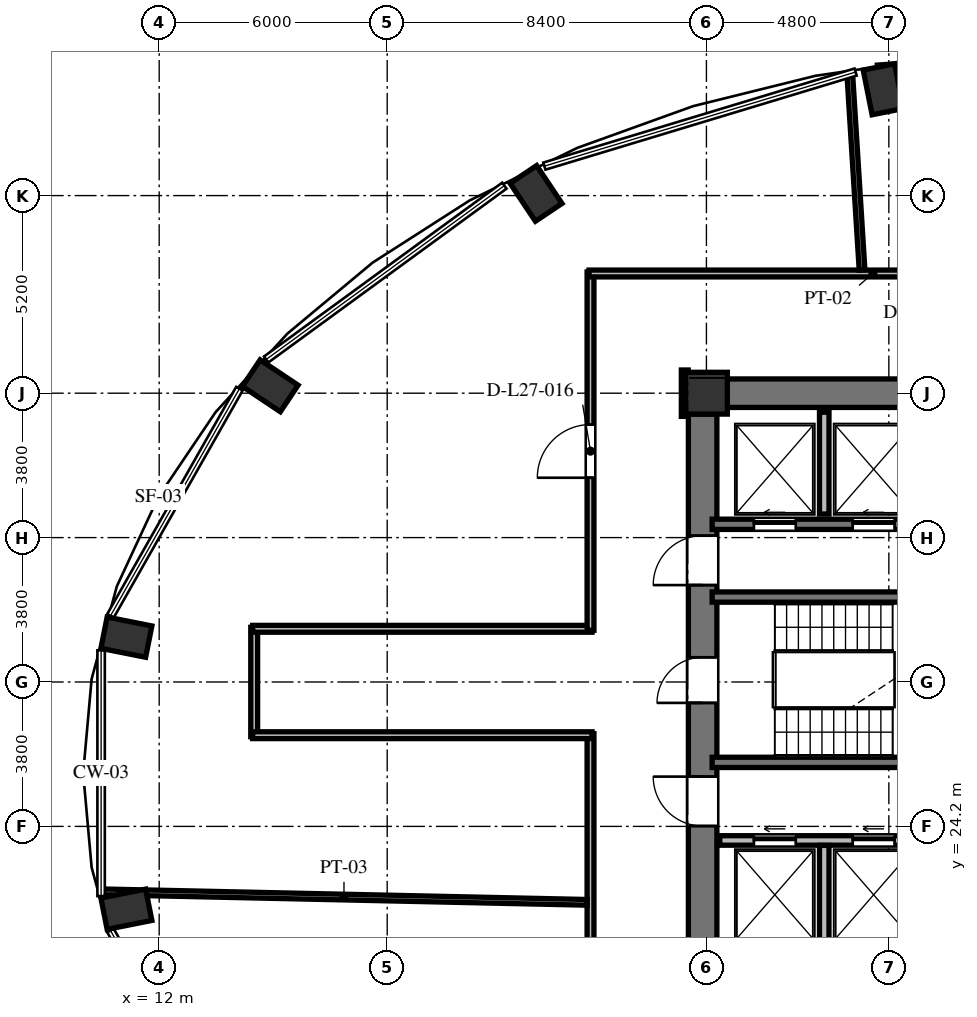
"""IFC4 building model, lengths in metres.
Left out: names, types, materials, properties, quantities, classifications, styles, units other than length and angle.
Written with IfcOpenShell. Run it as: python <this file> out.ifc"""

import sys

from ifc_helpers import new_model, si_unit, direction, frame, frame_2d, origin, origin_2d, place, context, subcontext, project, spatial, rectangle, extrude, element, fill, save


model = new_model("IFC4")
c1 = context("Model", 3, precision=1e-05, world=origin(), true_north=direction((0.0, 1.0)))
c2 = subcontext(c1, "Body", "Model", "MODEL_VIEW")
j1 = project(units=[si_unit("LENGTHUNIT", "METRE"), si_unit("PLANEANGLEUNIT", "RADIAN")], contexts=[c1])
p1 = place(None, origin())
s1 = spatial("IfcSite", under=j1, at=p1, CompositionType="ELEMENT")
p2 = place(p1, origin())
s2 = spatial("IfcBuilding", under=s1, at=p2, CompositionType="ELEMENT")
p3 = place(p2, frame((0.0, 0.0, 107.28)))
s3 = spatial("IfcBuildingStorey", under=s2, at=p3, CompositionType="ELEMENT", Elevation=107.28)
for number, where, z_axis, x_axis in (
    (1, (31.054, 43.597, 0.0), (0.0, 0.0, 1.0), (-0.195, 0.981, 0.0)),
    (2, (21.916, 40.857, 0.0), (0.0, 0.0, 1.0), (-0.556, 0.831, 0.0)),
    (3, (14.922, 35.795, 0.0), (0.0, 0.0, 1.0), (-0.831, 0.556, 0.0)),
    (4, (11.137, 29.18, 0.0), (0.0, 0.0, 1.0), (-0.981, 0.195, 0.0)),
    (5, (11.137, 22.02, 0.0), (0.0, 0.0, 1.0), (-0.981, -0.195, 0.0)),
):
    element("IfcColumn", number, at=place(p3, frame(where, z_axis=z_axis, x_axis=x_axis)), inside=s3, PredefinedType="COLUMN", context=c2, shape_type="SweptSolid", body=[
        extrude(rectangle(XDim=1.2, YDim=0.84, at=origin_2d()), origin(), (0.0, 0.0, 1.0), 3.648),
    ])
p4 = place(p3, frame((26.4, 35.6, 0.0), z_axis=(0.0, 0.0, 1.0), x_axis=(1.0, 0.0, 0.0)))
e6 = element("IfcColumn", 6, at=p4, inside=s3, PredefinedType="COLUMN", context=c2, shape_type="SweptSolid", body=[
    extrude(rectangle(XDim=1.1, YDim=1.1, at=origin_2d()), origin(), (0.0, 0.0, 1.0), 3.648),
])
p5 = place(p3, frame((26.3, 20.95, 0.0), z_axis=(0.0, 0.0, 1.0), x_axis=(0.0, 1.0, 0.0)))
e7 = element("IfcWall", 7, at=p5, inside=s3, PredefinedType="SHEAR", context=c2, shape_type="SweptSolid", body=[
    extrude(rectangle(XDim=14.1, YDim=0.75, at=frame_2d((7.05, 0.0))), origin(), (0.0, 0.0, 1.0), 3.648),
])
p6 = place(p5, frame((6.5, 0.0, 0.0)))
e8 = element("IfcOpeningElement", 8, at=p6, cuts=e7, PredefinedType="OPENING", context=c2, shape_type="SweptSolid", body=[
    extrude(rectangle(XDim=1.2, YDim=2.15, at=frame_2d((0.6, 1.075))), frame((0.0, 0.385, 0.0), z_axis=(0.0, -1.0, 0.0), x_axis=(1.0, 0.0, 0.0)), (0.0, 0.0, 1.0), 0.77),
])
p7 = place(p5, frame((9.6, 0.0, 0.0)))
e9 = element("IfcOpeningElement", 9, at=p7, cuts=e7, PredefinedType="OPENING", context=c2, shape_type="SweptSolid", body=[
    extrude(rectangle(XDim=1.3, YDim=2.2, at=frame_2d((0.65, 1.1))), frame((0.0, 0.385, 0.0), z_axis=(0.0, -1.0, 0.0), x_axis=(1.0, 0.0, 0.0)), (0.0, 0.0, 1.0), 0.77),
])
p8 = place(p5, frame((3.26, 0.0, 0.0)))
e10 = element("IfcOpeningElement", 10, at=p8, cuts=e7, PredefinedType="OPENING", context=c2, shape_type="SweptSolid", body=[
    extrude(rectangle(XDim=1.3, YDim=2.2, at=frame_2d((0.65, 1.1))), frame((0.0, 0.385, 0.0), z_axis=(0.0, -1.0, 0.0), x_axis=(1.0, 0.0, 0.0)), (0.0, 0.0, 1.0), 0.77),
])
p9 = place(p3, frame((26.95, 35.6, 0.0), z_axis=(0.0, 0.0, 1.0), x_axis=(1.0, 0.0, 0.0)))
e11 = element("IfcWall", 11, at=p9, inside=s3, PredefinedType="SHEAR", context=c2, shape_type="SweptSolid", body=[
    extrude(rectangle(XDim=5.375, YDim=0.75, at=frame_2d((2.688, 0.0))), origin(), (0.0, 0.0, 1.0), 3.648),
])
p10 = place(p3, frame((36.179, 44.453, 0.0), z_axis=(0.0, 0.0, 1.0), x_axis=(-0.997431890304, -0.071621394884, 0.0)))
e12 = element("IfcWall", 12, at=p10, inside=s3, PredefinedType="SOLIDWALL", context=c2, shape_type="SweptSolid", body=[
    extrude(rectangle(XDim=5.284, YDim=0.32, at=frame_2d((2.642, 0.0))), origin(), (0.0, 0.0, 1.0), 3.428),
])
p11 = place(p10, frame((2.042, 0.0, 0.85)))
e13 = element("IfcOpeningElement", 13, at=p11, cuts=e12, PredefinedType="OPENING", context=c2, shape_type="SweptSolid", body=[
    extrude(rectangle(XDim=1.2, YDim=1.8, at=frame_2d((0.6, 0.9))), frame((0.0, 0.17, 0.0), z_axis=(0.0, -1.0, 0.0), x_axis=(1.0, 0.0, 0.0)), (0.0, 0.0, 1.0), 0.34),
])
for number, where, z_axis, x_axis in (
    (14, (26.55, 30.235, 0.0), (0.0, 0.0, 1.0), (1.0, 0.0, 0.0)),
    (15, (26.55, 25.885, 0.0), (0.0, 0.0, 1.0), (1.0, 0.0, 0.0)),
):
    element("IfcWall", number, at=place(p3, frame(where, z_axis=z_axis, x_axis=x_axis)), inside=s3, PredefinedType="SHEAR", context=c2, shape_type="SweptSolid", body=[
        extrude(rectangle(XDim=7.985, YDim=0.27, at=frame_2d((3.992, 0.0))), origin(), (0.0, 0.0, 1.0), 3.648),
    ])
p12 = place(p3, frame((26.55, 32.15, 0.0), z_axis=(0.0, 0.0, 1.0), x_axis=(1.0, 0.0, 0.0)))
e16 = element("IfcWall", 16, at=p12, inside=s3, PredefinedType="SHEAR", context=c2, shape_type="SweptSolid", body=[
    extrude(rectangle(XDim=16.4, YDim=0.27, at=frame_2d((8.2, 0.0))), origin(), (0.0, 0.0, 1.0), 3.648),
])
p13 = place(p12, frame((1.1, 0.0, 0.0)))
e17 = element("IfcOpeningElement", 17, at=p13, cuts=e16, PredefinedType="OPENING", context=c2, shape_type="SweptSolid", body=[
    extrude(rectangle(XDim=1.1, YDim=2.2, at=frame_2d((0.55, 1.1))), frame((0.0, 0.145, 0.0), z_axis=(0.0, -1.0, 0.0), x_axis=(1.0, 0.0, 0.0)), (0.0, 0.0, 1.0), 0.29),
])
p14 = place(p12, frame((3.7, 0.0, 0.0)))
e18 = element("IfcOpeningElement", 18, at=p14, cuts=e16, PredefinedType="OPENING", context=c2, shape_type="SweptSolid", body=[
    extrude(rectangle(XDim=1.1, YDim=2.2, at=frame_2d((0.55, 1.1))), frame((0.0, 0.145, 0.0), z_axis=(0.0, -1.0, 0.0), x_axis=(1.0, 0.0, 0.0)), (0.0, 0.0, 1.0), 0.29),
])
p15 = place(p12, frame((6.5, 0.0, 0.0)))
e19 = element("IfcOpeningElement", 19, at=p15, cuts=e16, PredefinedType="OPENING", context=c2, shape_type="SweptSolid", body=[
    extrude(rectangle(XDim=1.1, YDim=2.2, at=frame_2d((0.55, 1.1))), frame((0.0, 0.145, 0.0), z_axis=(0.0, -1.0, 0.0), x_axis=(1.0, 0.0, 0.0)), (0.0, 0.0, 1.0), 0.29),
])
p16 = place(p12, frame((9.1, 0.0, 0.0)))
e20 = element("IfcOpeningElement", 20, at=p16, cuts=e16, PredefinedType="OPENING", context=c2, shape_type="SweptSolid", body=[
    extrude(rectangle(XDim=1.1, YDim=2.2, at=frame_2d((0.55, 1.1))), frame((0.0, 0.145, 0.0), z_axis=(0.0, -1.0, 0.0), x_axis=(1.0, 0.0, 0.0)), (0.0, 0.0, 1.0), 0.29),
])
p17 = place(p12, frame((11.9, 0.0, 0.0)))
e21 = element("IfcOpeningElement", 21, at=p17, cuts=e16, PredefinedType="OPENING", context=c2, shape_type="SweptSolid", body=[
    extrude(rectangle(XDim=1.1, YDim=2.2, at=frame_2d((0.55, 1.1))), frame((0.0, 0.145, 0.0), z_axis=(0.0, -1.0, 0.0), x_axis=(1.0, 0.0, 0.0)), (0.0, 0.0, 1.0), 0.29),
])
p18 = place(p12, frame((14.5, 0.0, 0.0)))
e22 = element("IfcOpeningElement", 22, at=p18, cuts=e16, PredefinedType="OPENING", context=c2, shape_type="SweptSolid", body=[
    extrude(rectangle(XDim=1.1, YDim=2.2, at=frame_2d((0.55, 1.1))), frame((0.0, 0.145, 0.0), z_axis=(0.0, -1.0, 0.0), x_axis=(1.0, 0.0, 0.0)), (0.0, 0.0, 1.0), 0.29),
])
p19 = place(p3, frame((26.75, 23.83, 0.0), z_axis=(0.0, 0.0, 1.0), x_axis=(1.0, 0.0, 0.0)))
e23 = element("IfcWall", 23, at=p19, inside=s3, PredefinedType="SOLIDWALL", context=c2, shape_type="SweptSolid", body=[
    extrude(rectangle(XDim=16.2, YDim=0.25, at=frame_2d((8.1, 0.0))), origin(), (0.0, 0.0, 1.0), 3.428),
])
p20 = place(p19, frame((0.9, 0.0, 0.0)))
e24 = element("IfcOpeningElement", 24, at=p20, cuts=e23, PredefinedType="OPENING", context=c2, shape_type="SweptSolid", body=[
    extrude(rectangle(XDim=1.1, YDim=2.2, at=frame_2d((0.55, 1.1))), frame((0.0, 0.135, 0.0), z_axis=(0.0, -1.0, 0.0), x_axis=(1.0, 0.0, 0.0)), (0.0, 0.0, 1.0), 0.27),
])
p21 = place(p19, frame((3.5, 0.0, 0.0)))
e25 = element("IfcOpeningElement", 25, at=p21, cuts=e23, PredefinedType="OPENING", context=c2, shape_type="SweptSolid", body=[
    extrude(rectangle(XDim=1.1, YDim=2.2, at=frame_2d((0.55, 1.1))), frame((0.0, 0.135, 0.0), z_axis=(0.0, -1.0, 0.0), x_axis=(1.0, 0.0, 0.0)), (0.0, 0.0, 1.0), 0.27),
])
p22 = place(p19, frame((6.3, 0.0, 0.0)))
e26 = element("IfcOpeningElement", 26, at=p22, cuts=e23, PredefinedType="OPENING", context=c2, shape_type="SweptSolid", body=[
    extrude(rectangle(XDim=1.1, YDim=2.2, at=frame_2d((0.55, 1.1))), frame((0.0, 0.135, 0.0), z_axis=(0.0, -1.0, 0.0), x_axis=(1.0, 0.0, 0.0)), (0.0, 0.0, 1.0), 0.27),
])
p23 = place(p19, frame((8.9, 0.0, 0.0)))
e27 = element("IfcOpeningElement", 27, at=p23, cuts=e23, PredefinedType="OPENING", context=c2, shape_type="SweptSolid", body=[
    extrude(rectangle(XDim=1.1, YDim=2.2, at=frame_2d((0.55, 1.1))), frame((0.0, 0.135, 0.0), z_axis=(0.0, -1.0, 0.0), x_axis=(1.0, 0.0, 0.0)), (0.0, 0.0, 1.0), 0.27),
])
p24 = place(p19, frame((11.7, 0.0, 0.0)))
e28 = element("IfcOpeningElement", 28, at=p24, cuts=e23, PredefinedType="OPENING", context=c2, shape_type="SweptSolid", body=[
    extrude(rectangle(XDim=1.1, YDim=2.2, at=frame_2d((0.55, 1.1))), frame((0.0, 0.135, 0.0), z_axis=(0.0, -1.0, 0.0), x_axis=(1.0, 0.0, 0.0)), (0.0, 0.0, 1.0), 0.27),
])
p25 = place(p19, frame((14.15, 0.0, 0.0)))
e29 = element("IfcOpeningElement", 29, at=p25, cuts=e23, PredefinedType="OPENING", context=c2, shape_type="SweptSolid", body=[
    extrude(rectangle(XDim=1.4, YDim=2.3, at=frame_2d((0.7, 1.15))), frame((0.0, 0.135, 0.0), z_axis=(0.0, -1.0, 0.0), x_axis=(1.0, 0.0, 0.0)), (0.0, 0.0, 1.0), 0.27),
])
p26 = place(p3, frame((29.5, 32.42, 0.0), z_axis=(0.0, 0.0, 1.0), x_axis=(0.0, 1.0, 0.0)))
e30 = element("IfcWall", 30, at=p26, inside=s3, PredefinedType="SOLIDWALL", context=c2, shape_type="SweptSolid", body=[
    extrude(rectangle(XDim=2.68, YDim=0.25, at=frame_2d((1.34, 0.0))), origin(), (0.0, 0.0, 1.0), 3.428),
])
p27 = place(p3, frame((29.5, 20.9, 0.0), z_axis=(0.0, 0.0, 1.0), x_axis=(0.0, 1.0, 0.0)))
e31 = element("IfcWall", 31, at=p27, inside=s3, PredefinedType="SOLIDWALL", context=c2, shape_type="SweptSolid", body=[
    extrude(rectangle(XDim=2.8, YDim=0.25, at=frame_2d((1.4, 0.0))), origin(), (0.0, 0.0, 1.0), 3.428),
])
p28 = place(p3, frame((14.5, 26.56, 0.0), z_axis=(0.0, 0.0, 1.0), x_axis=(0.0, 1.0, 0.0)))
e32 = element("IfcWall", 32, at=p28, inside=s3, PredefinedType="PARTITIONING", context=c2, shape_type="SweptSolid", body=[
    extrude(rectangle(XDim=2.88, YDim=0.18, at=frame_2d((1.44, 0.0))), origin(), (0.0, 0.0, 1.0), 3.013),
])
p29 = place(p3, frame((14.46, 29.4, 0.0), z_axis=(0.0, 0.0, 1.0), x_axis=(1.0, 0.0, 0.0)))
e33 = element("IfcWall", 33, at=p29, inside=s3, PredefinedType="PARTITIONING", context=c2, shape_type="SweptSolid", body=[
    extrude(rectangle(XDim=8.93, YDim=0.18, at=frame_2d((4.465, 0.0))), origin(), (0.0, 0.0, 1.0), 3.428),
])
p30 = place(p3, frame((23.35, 29.36, 0.0), z_axis=(0.0, 0.0, 1.0), x_axis=(0.0, 1.0, 0.0)))
e34 = element("IfcWall", 34, at=p30, inside=s3, PredefinedType="PARTITIONING", context=c2, shape_type="SweptSolid", body=[
    extrude(rectangle(XDim=9.43, YDim=0.18, at=frame_2d((4.715, 0.0))), origin(), (0.0, 0.0, 1.0), 3.428),
])
p31 = place(p30, frame((4.015, 0.0, 0.0)))
e35 = element("IfcOpeningElement", 35, at=p31, cuts=e34, PredefinedType="OPENING", context=c2, shape_type="SweptSolid", body=[
    extrude(rectangle(XDim=1.4, YDim=2.2, at=frame_2d((0.7, 1.1))), frame((0.0, 0.1, 0.0), z_axis=(0.0, -1.0, 0.0), x_axis=(1.0, 0.0, 0.0)), (0.0, 0.0, 1.0), 0.2),
])
p32 = place(p3, frame((23.31, 38.75, 0.0), z_axis=(0.0, 0.0, 1.0), x_axis=(1.0, 0.0, 0.0)))
e36 = element("IfcWall", 36, at=p32, inside=s3, PredefinedType="PARTITIONING", context=c2, shape_type="SweptSolid", body=[
    extrude(rectangle(XDim=29.88, YDim=0.18, at=frame_2d((14.94, 0.0))), origin(), (0.0, 0.0, 1.0), 3.053),
])
p33 = place(p32, frame((25.176, 0.0, 0.0)))
e37 = element("IfcOpeningElement", 37, at=p33, cuts=e36, PredefinedType="OPENING", context=c2, shape_type="SweptSolid", body=[
    extrude(rectangle(XDim=1.4, YDim=2.2, at=frame_2d((0.7, 1.1))), frame((0.0, 0.1, 0.0), z_axis=(0.0, -1.0, 0.0), x_axis=(1.0, 0.0, 0.0)), (0.0, 0.0, 1.0), 0.2),
])
p34 = place(p32, frame((18.989, 0.0, 0.0)))
e38 = element("IfcOpeningElement", 38, at=p34, cuts=e36, PredefinedType="OPENING", context=c2, shape_type="SweptSolid", body=[
    extrude(rectangle(XDim=1.4, YDim=2.2, at=frame_2d((0.7, 1.1))), frame((0.0, 0.1, 0.0), z_axis=(0.0, -1.0, 0.0), x_axis=(1.0, 0.0, 0.0)), (0.0, 0.0, 1.0), 0.2),
])
p35 = place(p32, frame((12.589, 0.0, 0.0)))
e39 = element("IfcOpeningElement", 39, at=p35, cuts=e36, PredefinedType="OPENING", context=c2, shape_type="SweptSolid", body=[
    extrude(rectangle(XDim=1.4, YDim=2.2, at=frame_2d((0.7, 1.1))), frame((0.0, 0.1, 0.0), z_axis=(0.0, -1.0, 0.0), x_axis=(1.0, 0.0, 0.0)), (0.0, 0.0, 1.0), 0.2),
])
p36 = place(p32, frame((8.188, 0.0, 0.0)))
e40 = element("IfcOpeningElement", 40, at=p36, cuts=e36, PredefinedType="OPENING", context=c2, shape_type="SweptSolid", body=[
    extrude(rectangle(XDim=1.4, YDim=2.2, at=frame_2d((0.7, 1.1))), frame((0.0, 0.1, 0.0), z_axis=(0.0, -1.0, 0.0), x_axis=(1.0, 0.0, 0.0)), (0.0, 0.0, 1.0), 0.2),
])
p37 = place(p3, frame((25.83, 36.21, 0.0), z_axis=(0.0, 0.0, 1.0), x_axis=(0.0, -1.0, 0.0)))
e41 = element("IfcWall", 41, at=p37, inside=s3, PredefinedType="PARTITIONING", context=c2, shape_type="SweptSolid", body=[
    extrude(rectangle(XDim=1.22, YDim=0.18, at=frame_2d((0.61, 0.0))), origin(), (0.0, 0.0, 1.0), 3.428),
])
p38 = place(p3, frame((23.35, 17.36, 0.0), z_axis=(0.0, 0.0, 1.0), x_axis=(0.0, 1.0, 0.0)))
e42 = element("IfcWall", 42, at=p38, inside=s3, PredefinedType="PARTITIONING", context=c2, shape_type="SweptSolid", body=[
    extrude(rectangle(XDim=9.28, YDim=0.18, at=frame_2d((4.64, 0.0))), origin(), (0.0, 0.0, 1.0), 3.428),
])
p39 = place(p3, frame((23.39, 26.6, 0.0), z_axis=(0.0, 0.0, 1.0), x_axis=(-1.0, 0.0, 0.0)))
e43 = element("IfcWall", 43, at=p39, inside=s3, PredefinedType="PARTITIONING", context=c2, shape_type="SweptSolid", body=[
    extrude(rectangle(XDim=8.93, YDim=0.18, at=frame_2d((4.465, 0.0))), origin(), (0.0, 0.0, 1.0), 3.428),
])
p40 = place(p3, frame((10.465, 22.479, 0.0), z_axis=(0.0, 0.0, 1.0), x_axis=(0.999765147572, -0.021671402821, 0.0)))
e44 = element("IfcWall", 44, at=p40, inside=s3, PredefinedType="PARTITIONING", context=c2, shape_type="SweptSolid", body=[
    extrude(rectangle(XDim=12.798, YDim=0.15, at=frame_2d((6.399, 0.0))), origin(), (0.0, 0.0, 1.0), 3.428),
])
p41 = place(p3, frame((30.495, 38.84, 0.0), z_axis=(0.0, 0.0, 1.0), x_axis=(-0.062595600558, 0.998038972581, 0.0)))
e45 = element("IfcWall", 45, at=p41, inside=s3, PredefinedType="PARTITIONING", context=c2, shape_type="SweptSolid", body=[
    extrude(rectangle(XDim=5.176, YDim=0.15, at=frame_2d((2.588, 0.0))), origin(), (0.0, 0.0, 1.0), 3.428),
])
p42 = place(p6, origin())
e46 = element("IfcDoor", 46, at=p42, inside=s3, OperationType="SINGLE_SWING_LEFT", PredefinedType="DOOR", context=c2, shape_type="SweptSolid", body=[
    extrude(rectangle(XDim=1.2, YDim=2.15, at=frame_2d((0.6, 1.075))), frame((0.0, 0.025, 0.0), z_axis=(0.0, -1.0, 0.0), x_axis=(1.0, 0.0, 0.0)), (0.0, 0.0, 1.0), 0.05),
])
fill(e8, e46)
p43 = place(p7, origin())
e47 = element("IfcDoor", 47, at=p43, inside=s3, OperationType="SINGLE_SWING_LEFT", PredefinedType="DOOR", context=c2, shape_type="SweptSolid", body=[
    extrude(rectangle(XDim=1.3, YDim=2.2, at=frame_2d((0.65, 1.1))), frame((0.0, 0.025, 0.0), z_axis=(0.0, -1.0, 0.0), x_axis=(1.0, 0.0, 0.0)), (0.0, 0.0, 1.0), 0.05),
])
fill(e9, e47)
p44 = place(p8, origin())
e48 = element("IfcDoor", 48, at=p44, inside=s3, OperationType="SINGLE_SWING_RIGHT", PredefinedType="DOOR", context=c2, shape_type="SweptSolid", body=[
    extrude(rectangle(XDim=1.3, YDim=2.2, at=frame_2d((0.65, 1.1))), frame((0.0, 0.025, 0.0), z_axis=(0.0, -1.0, 0.0), x_axis=(1.0, 0.0, 0.0)), (0.0, 0.0, 1.0), 0.05),
])
fill(e10, e48)
p45 = place(p13, origin())
e49 = element("IfcDoor", 49, at=p45, inside=s3, OperationType="SLIDING_TO_LEFT", PredefinedType="DOOR", context=c2, shape_type="SweptSolid", body=[
    extrude(rectangle(XDim=1.1, YDim=2.2, at=frame_2d((0.55, 1.1))), frame((0.0, 0.025, 0.0), z_axis=(0.0, -1.0, 0.0), x_axis=(1.0, 0.0, 0.0)), (0.0, 0.0, 1.0), 0.05),
])
fill(e17, e49)
p46 = place(p14, origin())
e50 = element("IfcDoor", 50, at=p46, inside=s3, OperationType="SLIDING_TO_LEFT", PredefinedType="DOOR", context=c2, shape_type="SweptSolid", body=[
    extrude(rectangle(XDim=1.1, YDim=2.2, at=frame_2d((0.55, 1.1))), frame((0.0, 0.025, 0.0), z_axis=(0.0, -1.0, 0.0), x_axis=(1.0, 0.0, 0.0)), (0.0, 0.0, 1.0), 0.05),
])
fill(e18, e50)
p47 = place(p20, origin())
e51 = element("IfcDoor", 51, at=p47, inside=s3, OperationType="SLIDING_TO_LEFT", PredefinedType="DOOR", context=c2, shape_type="SweptSolid", body=[
    extrude(rectangle(XDim=1.1, YDim=2.2, at=frame_2d((0.55, 1.1))), frame((0.0, 0.025, 0.0), z_axis=(0.0, -1.0, 0.0), x_axis=(1.0, 0.0, 0.0)), (0.0, 0.0, 1.0), 0.05),
])
fill(e24, e51)
p48 = place(p21, origin())
e52 = element("IfcDoor", 52, at=p48, inside=s3, OperationType="SLIDING_TO_LEFT", PredefinedType="DOOR", context=c2, shape_type="SweptSolid", body=[
    extrude(rectangle(XDim=1.1, YDim=2.2, at=frame_2d((0.55, 1.1))), frame((0.0, 0.025, 0.0), z_axis=(0.0, -1.0, 0.0), x_axis=(1.0, 0.0, 0.0)), (0.0, 0.0, 1.0), 0.05),
])
fill(e25, e52)
p49 = place(p31, origin())
e53 = element("IfcDoor", 53, at=p49, inside=s3, OperationType="SINGLE_SWING_LEFT", PredefinedType="DOOR", context=c2, shape_type="SweptSolid", body=[
    extrude(rectangle(XDim=1.4, YDim=2.2, at=frame_2d((0.7, 1.1))), frame((0.0, 0.025, 0.0), z_axis=(0.0, -1.0, 0.0), x_axis=(1.0, 0.0, 0.0)), (0.0, 0.0, 1.0), 0.05),
])
fill(e35, e53)
save(model, sys.argv[1])
